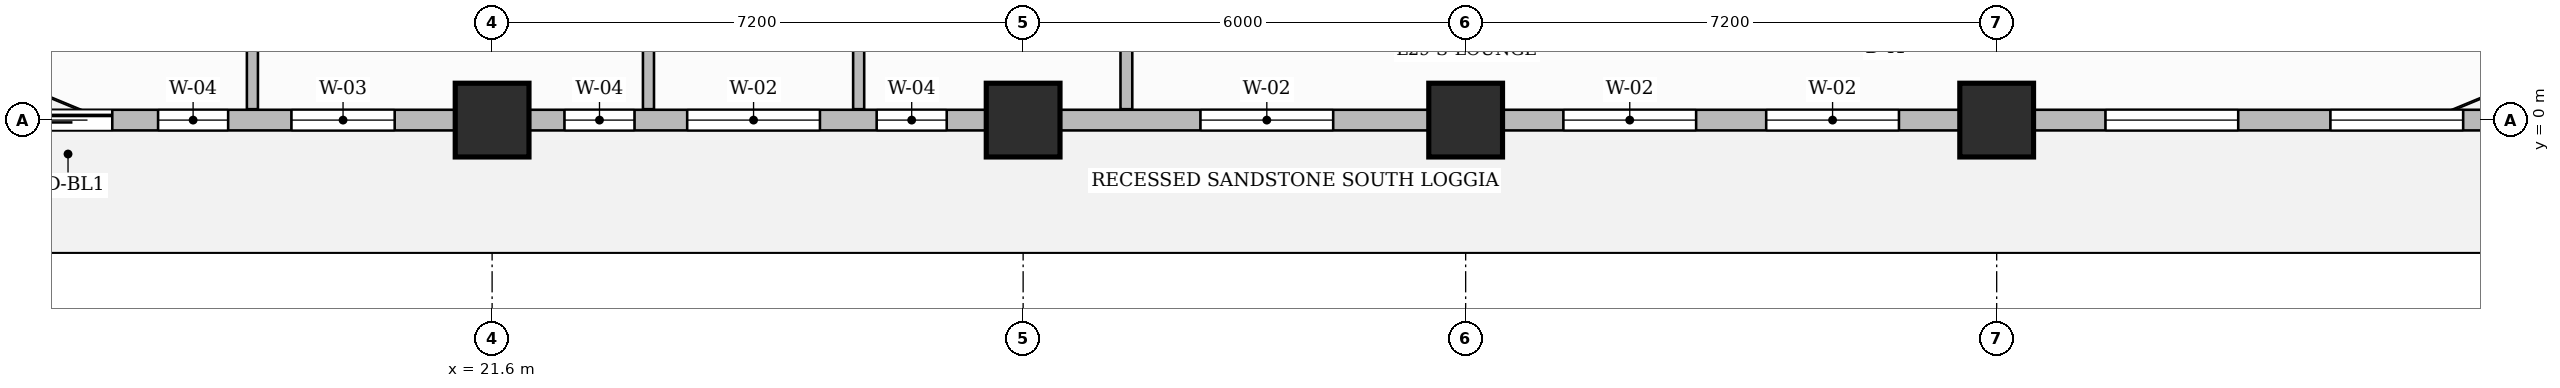
"""IFC4 building model, lengths in metres.
Left out: names, types, materials, properties, quantities, classifications, styles, units other than length and angle.
Written with IfcOpenShell. Run it as: python <this file> out.ifc"""

import sys

from ifc_helpers import new_model, si_unit, direction, frame, frame_2d, origin, origin_2d, place, context, subcontext, project, spatial, rectangle, extrude, source, transform, mapped, element, fill, save


model = new_model("IFC4")
c1 = context("Model", 3, precision=1e-05, world=origin(), true_north=direction((0.0, 1.0)))
c2 = subcontext(c1, "Body", "Model", "MODEL_VIEW")
j1 = project(units=[si_unit("LENGTHUNIT", "METRE"), si_unit("PLANEANGLEUNIT", "RADIAN")], contexts=[c1])
p1 = place(None, origin())
s1 = spatial("IfcSite", under=j1, at=p1, CompositionType="ELEMENT")
p2 = place(p1, origin())
s2 = spatial("IfcBuilding", under=s1, at=p2, CompositionType="ELEMENT")
p3 = place(p2, frame((0.0, 0.0, 119.2)))
s3 = spatial("IfcBuildingStorey", under=s2, at=p3, CompositionType="ELEMENT", Elevation=119.2)
m1 = source(origin(), c2, "Body", "SweptSolid", [
    extrude(rectangle(XDim=1.0, YDim=1.0, at=origin_2d()), origin(), (0.0, 0.0, 1.0), 3.7),
])
for number, where, z_axis, x_axis in (
    (1, (21.6, 0.0, 0.0), (0.0, 0.0, 1.0), (1.0, 0.0, 0.0)),
    (2, (28.8, 0.0, 0.0), (0.0, 0.0, 1.0), (1.0, 0.0, 0.0)),
    (3, (34.8, 0.0, 0.0), (0.0, 0.0, 1.0), (1.0, 0.0, 0.0)),
    (4, (42.0, 0.0, 0.0), (0.0, 0.0, 1.0), (1.0, 0.0, 0.0)),
):
    element("IfcColumn", number, at=place(p3, frame(where, z_axis=z_axis, x_axis=x_axis)), inside=s3, PredefinedType="COLUMN", context=c2, shape_type="MappedRepresentation", body=[
        mapped(m1, transform((0.0, 0.0, 0.0), scale=1.0)),
    ])
p4 = place(p3, frame((30.2, 0.148, 0.0), z_axis=(0.0, 0.0, 1.0), x_axis=(0.0, 1.0, 0.0)))
e5 = element("IfcWall", 5, at=p4, inside=s3, PredefinedType="PARTITIONING", context=c2, shape_type="SweptSolid", body=[
    extrude(rectangle(XDim=10.112, YDim=0.16, at=frame_2d((5.056, 0.0))), origin(), (0.0, 0.0, 1.0), 3.45),
])
p5 = place(p4, frame((1.977, 0.0, 0.0)))
e6 = element("IfcOpeningElement", 6, at=p5, cuts=e5, PredefinedType="OPENING", context=c2, shape_type="SweptSolid", body=[
    extrude(rectangle(XDim=1.05, YDim=2.15, at=frame_2d((0.525, 1.075))), frame((0.0, 0.09, 0.0), z_axis=(0.0, -1.0, 0.0), x_axis=(1.0, 0.0, 0.0)), (0.0, 0.0, 1.0), 0.18),
])
for number, where, z_axis, x_axis in (
    (7, (18.35, 0.148, 0.0), (0.0, 0.0, 1.0), (0.0, 1.0, 0.0)),
    (8, (23.72, 0.148, 0.0), (0.0, 0.0, 1.0), (0.0, 1.0, 0.0)),
    (9, (26.57, 0.148, 0.0), (0.0, 0.0, 1.0), (0.0, 1.0, 0.0)),
):
    element("IfcWall", number, at=place(p3, frame(where, z_axis=z_axis, x_axis=x_axis)), inside=s3, PredefinedType="PARTITIONING", context=c2, shape_type="SweptSolid", body=[
        extrude(rectangle(XDim=10.112, YDim=0.15, at=frame_2d((5.056, 0.0))), origin(), (0.0, 0.0, 1.0), 3.45),
    ])
p6 = place(p3, frame((14.4, 0.0, 0.0), z_axis=(0.0, 0.0, 1.0), x_axis=(1.0, 0.0, 0.0)))
e10 = element("IfcWall", 10, at=p6, inside=s3, PredefinedType="SOLIDWALL", context=c2, shape_type="SweptSolid", body=[
    extrude(rectangle(XDim=35.4, YDim=0.28, at=frame_2d((17.7, 0.0))), origin(), (0.0, 0.0, 1.0), 2.935),
])
p7 = place(p6, frame((0.85, 0.0, 0.0)))
e11 = element("IfcOpeningElement", 11, at=p7, cuts=e10, PredefinedType="OPENING", context=c2, shape_type="SweptSolid", body=[
    extrude(rectangle(XDim=1.2, YDim=2.2, at=frame_2d((0.6, 1.1))), frame((0.0, 0.15, 0.0), z_axis=(0.0, -1.0, 0.0), x_axis=(1.0, 0.0, 0.0)), (0.0, 0.0, 1.0), 0.3),
])
p8 = place(p6, frame((2.671, 0.0, 0.8)))
e12 = element("IfcOpeningElement", 12, at=p8, cuts=e10, PredefinedType="OPENING", context=c2, shape_type="SweptSolid", body=[
    extrude(rectangle(XDim=0.95, YDim=1.75, at=frame_2d((0.475, 0.875))), frame((0.0, 0.15, 0.0), z_axis=(0.0, -1.0, 0.0), x_axis=(1.0, 0.0, 0.0)), (0.0, 0.0, 1.0), 0.3),
])
p9 = place(p6, frame((4.479, 0.0, 0.8)))
e13 = element("IfcOpeningElement", 13, at=p9, cuts=e10, PredefinedType="OPENING", context=c2, shape_type="SweptSolid", body=[
    extrude(rectangle(XDim=1.4, YDim=1.85, at=frame_2d((0.7, 0.925))), frame((0.0, 0.15, 0.0), z_axis=(0.0, -1.0, 0.0), x_axis=(1.0, 0.0, 0.0)), (0.0, 0.0, 1.0), 0.3),
])
p10 = place(p6, frame((8.181, 0.0, 0.8)))
e14 = element("IfcOpeningElement", 14, at=p10, cuts=e10, PredefinedType="OPENING", context=c2, shape_type="SweptSolid", body=[
    extrude(rectangle(XDim=0.95, YDim=1.75, at=frame_2d((0.475, 0.875))), frame((0.0, 0.15, 0.0), z_axis=(0.0, -1.0, 0.0), x_axis=(1.0, 0.0, 0.0)), (0.0, 0.0, 1.0), 0.3),
])
p11 = place(p6, frame((9.845, 0.0, 0.8)))
e15 = element("IfcOpeningElement", 15, at=p11, cuts=e10, PredefinedType="OPENING", context=c2, shape_type="SweptSolid", body=[
    extrude(rectangle(XDim=1.8, YDim=1.85, at=frame_2d((0.9, 0.925))), frame((0.0, 0.15, 0.0), z_axis=(0.0, -1.0, 0.0), x_axis=(1.0, 0.0, 0.0)), (0.0, 0.0, 1.0), 0.3),
])
p12 = place(p6, frame((12.414, 0.0, 0.8)))
e16 = element("IfcOpeningElement", 16, at=p12, cuts=e10, PredefinedType="OPENING", context=c2, shape_type="SweptSolid", body=[
    extrude(rectangle(XDim=0.95, YDim=1.75, at=frame_2d((0.475, 0.875))), frame((0.0, 0.15, 0.0), z_axis=(0.0, -1.0, 0.0), x_axis=(1.0, 0.0, 0.0)), (0.0, 0.0, 1.0), 0.3),
])
p13 = place(p6, frame((16.804, 0.0, 0.8)))
e17 = element("IfcOpeningElement", 17, at=p13, cuts=e10, PredefinedType="OPENING", context=c2, shape_type="SweptSolid", body=[
    extrude(rectangle(XDim=1.8, YDim=1.85, at=frame_2d((0.9, 0.925))), frame((0.0, 0.15, 0.0), z_axis=(0.0, -1.0, 0.0), x_axis=(1.0, 0.0, 0.0)), (0.0, 0.0, 1.0), 0.3),
])
p14 = place(p6, frame((21.725, 0.0, 0.8)))
e18 = element("IfcOpeningElement", 18, at=p14, cuts=e10, PredefinedType="OPENING", context=c2, shape_type="SweptSolid", body=[
    extrude(rectangle(XDim=1.8, YDim=1.85, at=frame_2d((0.9, 0.925))), frame((0.0, 0.15, 0.0), z_axis=(0.0, -1.0, 0.0), x_axis=(1.0, 0.0, 0.0)), (0.0, 0.0, 1.0), 0.3),
])
p15 = place(p6, frame((24.475, 0.0, 0.8)))
e19 = element("IfcOpeningElement", 19, at=p15, cuts=e10, PredefinedType="OPENING", context=c2, shape_type="SweptSolid", body=[
    extrude(rectangle(XDim=1.8, YDim=1.85, at=frame_2d((0.9, 0.925))), frame((0.0, 0.15, 0.0), z_axis=(0.0, -1.0, 0.0), x_axis=(1.0, 0.0, 0.0)), (0.0, 0.0, 1.0), 0.3),
])
p16 = place(p6, frame((29.075, 0.0, 0.8)))
e20 = element("IfcOpeningElement", 20, at=p16, cuts=e10, PredefinedType="OPENING", context=c2, shape_type="SweptSolid", body=[
    extrude(rectangle(XDim=1.8, YDim=1.85, at=frame_2d((0.9, 0.925))), frame((0.0, 0.15, 0.0), z_axis=(0.0, -1.0, 0.0), x_axis=(1.0, 0.0, 0.0)), (0.0, 0.0, 1.0), 0.3),
])
p17 = place(p6, frame((32.125, 0.0, 0.8)))
e21 = element("IfcOpeningElement", 21, at=p17, cuts=e10, PredefinedType="OPENING", context=c2, shape_type="SweptSolid", body=[
    extrude(rectangle(XDim=1.8, YDim=1.85, at=frame_2d((0.9, 0.925))), frame((0.0, 0.15, 0.0), z_axis=(0.0, -1.0, 0.0), x_axis=(1.0, 0.0, 0.0)), (0.0, 0.0, 1.0), 0.3),
])
m2 = source(origin(), c2, "Body", "SweptSolid", [
    extrude(rectangle(XDim=1.2, YDim=2.2, at=frame_2d((0.6, 1.1))), frame((0.0, 0.025, 0.0), z_axis=(0.0, -1.0, 0.0), x_axis=(1.0, 0.0, 0.0)), (0.0, 0.0, 1.0), 0.05),
])
p18 = place(p7, origin())
e22 = element("IfcDoor", 22, at=p18, inside=s3, OperationType="SLIDING_TO_LEFT", PredefinedType="DOOR", context=c2, shape_type="MappedRepresentation", body=[
    mapped(m2, transform((0.0, 0.0, 0.0), scale=1.0)),
])
fill(e11, e22)
m3 = source(origin(), c2, "Body", "SweptSolid", [
    extrude(rectangle(XDim=0.95, YDim=1.75, at=frame_2d((0.475, 0.875))), frame((0.0, 0.03, 0.0), z_axis=(0.0, -1.0, 0.0), x_axis=(1.0, 0.0, 0.0)), (0.0, 0.0, 1.0), 0.06),
])
p19 = place(p8, origin())
e23 = element("IfcWindow", 23, at=p19, inside=s3, PartitioningType="SINGLE_PANEL", PredefinedType="WINDOW", context=c2, shape_type="MappedRepresentation", body=[
    mapped(m3, transform((0.0, 0.0, 0.0), scale=1.0)),
])
fill(e12, e23)
m4 = source(origin(), c2, "Body", "SweptSolid", [
    extrude(rectangle(XDim=1.4, YDim=1.85, at=frame_2d((0.7, 0.925))), frame((0.0, 0.03, 0.0), z_axis=(0.0, -1.0, 0.0), x_axis=(1.0, 0.0, 0.0)), (0.0, 0.0, 1.0), 0.06),
])
p20 = place(p9, origin())
e24 = element("IfcWindow", 24, at=p20, inside=s3, PartitioningType="SINGLE_PANEL", PredefinedType="WINDOW", context=c2, shape_type="MappedRepresentation", body=[
    mapped(m4, transform((0.0, 0.0, 0.0), scale=1.0)),
])
fill(e13, e24)
p21 = place(p10, origin())
e25 = element("IfcWindow", 25, at=p21, inside=s3, PartitioningType="SINGLE_PANEL", PredefinedType="WINDOW", context=c2, shape_type="MappedRepresentation", body=[
    mapped(m3, transform((0.0, 0.0, 0.0), scale=1.0)),
])
fill(e14, e25)
m5 = source(origin(), c2, "Body", "SweptSolid", [
    extrude(rectangle(XDim=1.8, YDim=1.85, at=frame_2d((0.9, 0.925))), frame((0.0, 0.03, 0.0), z_axis=(0.0, -1.0, 0.0), x_axis=(1.0, 0.0, 0.0)), (0.0, 0.0, 1.0), 0.06),
])
p22 = place(p11, origin())
e26 = element("IfcWindow", 26, at=p22, inside=s3, PartitioningType="DOUBLE_PANEL_VERTICAL", PredefinedType="WINDOW", context=c2, shape_type="MappedRepresentation", body=[
    mapped(m5, transform((0.0, 0.0, 0.0), scale=1.0)),
])
fill(e15, e26)
p23 = place(p12, origin())
e27 = element("IfcWindow", 27, at=p23, inside=s3, PartitioningType="SINGLE_PANEL", PredefinedType="WINDOW", context=c2, shape_type="MappedRepresentation", body=[
    mapped(m3, transform((0.0, 0.0, 0.0), scale=1.0)),
])
fill(e16, e27)
p24 = place(p13, origin())
e28 = element("IfcWindow", 28, at=p24, inside=s3, PartitioningType="DOUBLE_PANEL_VERTICAL", PredefinedType="WINDOW", context=c2, shape_type="MappedRepresentation", body=[
    mapped(m5, transform((0.0, 0.0, 0.0), scale=1.0)),
])
fill(e17, e28)
p25 = place(p14, origin())
e29 = element("IfcWindow", 29, at=p25, inside=s3, PartitioningType="DOUBLE_PANEL_VERTICAL", PredefinedType="WINDOW", context=c2, shape_type="MappedRepresentation", body=[
    mapped(m5, transform((0.0, 0.0, 0.0), scale=1.0)),
])
fill(e18, e29)
p26 = place(p15, origin())
e30 = element("IfcWindow", 30, at=p26, inside=s3, PartitioningType="DOUBLE_PANEL_VERTICAL", PredefinedType="WINDOW", context=c2, shape_type="MappedRepresentation", body=[
    mapped(m5, transform((0.0, 0.0, 0.0), scale=1.0)),
])
fill(e19, e30)
p27 = place(p16, origin())
e31 = element("IfcWindow", 31, at=p27, inside=s3, PartitioningType="DOUBLE_PANEL_VERTICAL", PredefinedType="WINDOW", context=c2, shape_type="MappedRepresentation", body=[
    mapped(m5, transform((0.0, 0.0, 0.0), scale=1.0)),
])
fill(e20, e31)
p28 = place(p17, origin())
e32 = element("IfcWindow", 32, at=p28, inside=s3, PartitioningType="DOUBLE_PANEL_VERTICAL", PredefinedType="WINDOW", context=c2, shape_type="MappedRepresentation", body=[
    mapped(m5, transform((0.0, 0.0, 0.0), scale=1.0)),
])
fill(e21, e32)
save(model, sys.argv[1])
